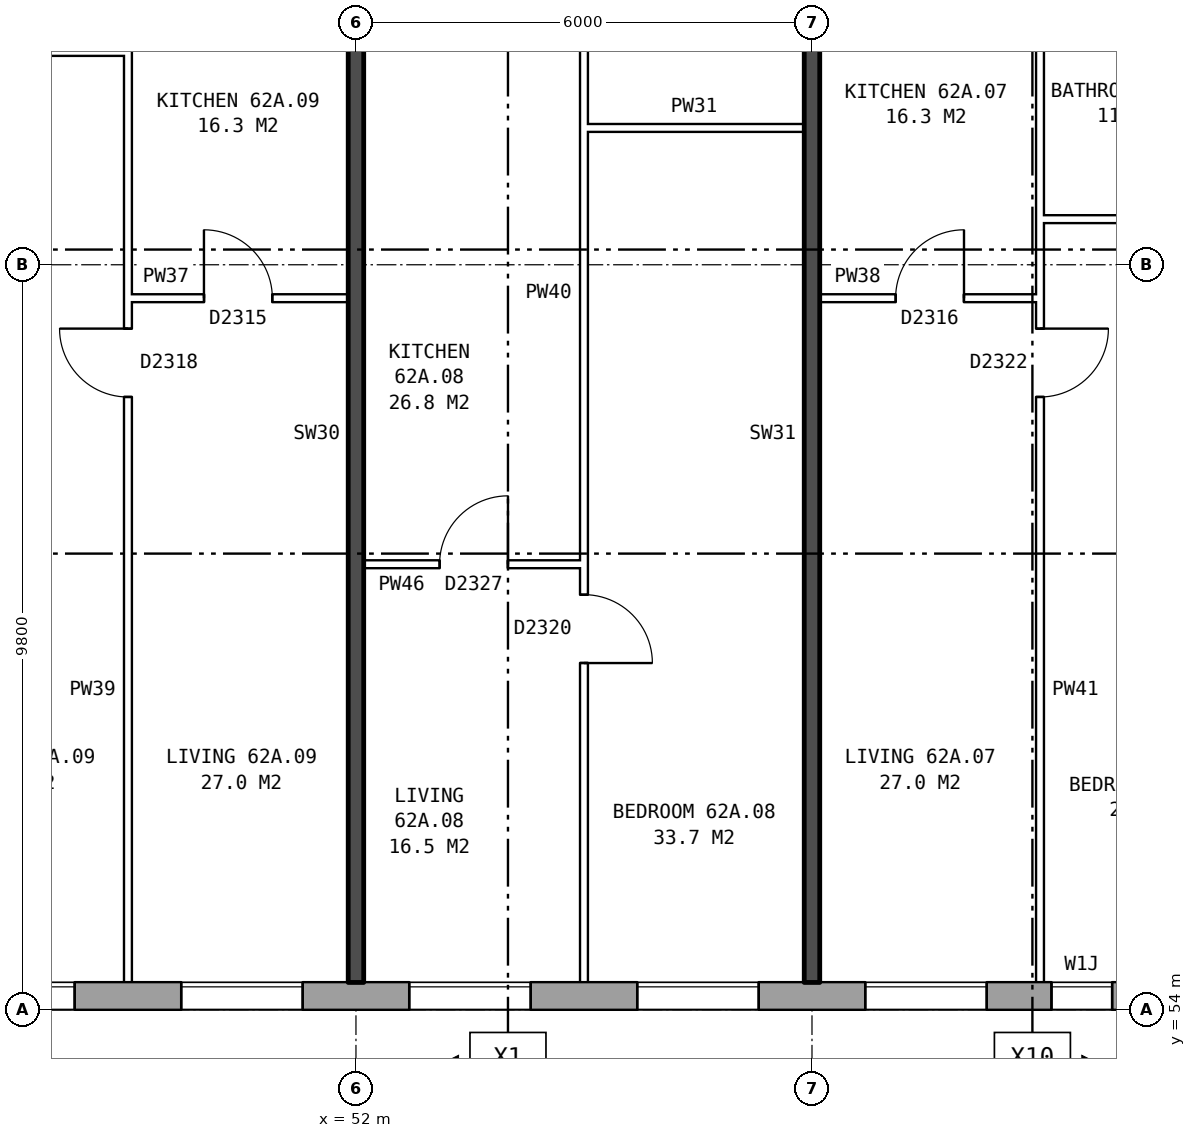
"""IFC4 building model, lengths in metres.
Left out: names, types, materials, properties, quantities, classifications, styles, units other than length and angle.
Written with IfcOpenShell. Run it as: python <this file> out.ifc"""

import sys

from ifc_helpers import new_model, si_unit, direction, frame, frame_2d, origin, place, context, subcontext, project, spatial, rectangle, extrude, element, fill, save


model = new_model("IFC4")
c1 = context("Model", 3, precision=1e-05, world=origin(), true_north=direction((0.0, 1.0)))
c2 = subcontext(c1, "Body", "Model", "MODEL_VIEW")
j1 = project(units=[si_unit("LENGTHUNIT", "METRE"), si_unit("PLANEANGLEUNIT", "RADIAN")], contexts=[c1])
p1 = place(None, origin())
s1 = spatial("IfcSite", under=j1, at=p1, CompositionType="ELEMENT")
p2 = place(p1, origin())
s2 = spatial("IfcBuilding", under=s1, at=p2, CompositionType="ELEMENT")
p3 = place(p2, frame((0.0, 0.0, 221.4)))
s3 = spatial("IfcBuildingStorey", under=s2, at=p3, CompositionType="ELEMENT", Elevation=221.4)
p4 = place(p3, frame((35.075, 54.18, 0.0), z_axis=(0.0, 0.0, 1.0), x_axis=(1.0, 0.0, 0.0)))
e1 = element("IfcWall", 1, at=p4, inside=s3, PredefinedType="STANDARD", context=c2, shape_type="SweptSolid", body=[
    extrude(rectangle(XDim=39.875, YDim=0.36, at=frame_2d((19.938, 0.0))), origin(), (0.0, 0.0, 1.0), 2.85),
])
p5 = place(p4, frame((2.625, 0.0, 0.8)))
e2 = element("IfcOpeningElement", 2, at=p5, cuts=e1, PredefinedType="OPENING", context=c2, shape_type="SweptSolid", body=[
    extrude(rectangle(XDim=1.6, YDim=1.8, at=frame_2d((0.8, 0.9))), frame((0.0, 0.19, 0.0), z_axis=(0.0, -1.0, 0.0), x_axis=(1.0, 0.0, 0.0)), (0.0, 0.0, 1.0), 0.38),
])
p6 = place(p4, frame((5.625, 0.0, 0.8)))
e3 = element("IfcOpeningElement", 3, at=p6, cuts=e1, PredefinedType="OPENING", context=c2, shape_type="SweptSolid", body=[
    extrude(rectangle(XDim=1.6, YDim=1.8, at=frame_2d((0.8, 0.9))), frame((0.0, 0.19, 0.0), z_axis=(0.0, -1.0, 0.0), x_axis=(1.0, 0.0, 0.0)), (0.0, 0.0, 1.0), 0.38),
])
p7 = place(p4, frame((7.525, 0.0, 0.8)))
e4 = element("IfcOpeningElement", 4, at=p7, cuts=e1, PredefinedType="OPENING", context=c2, shape_type="SweptSolid", body=[
    extrude(rectangle(XDim=1.4, YDim=1.8, at=frame_2d((0.7, 0.9))), frame((0.0, 0.19, 0.0), z_axis=(0.0, -1.0, 0.0), x_axis=(1.0, 0.0, 0.0)), (0.0, 0.0, 1.0), 0.38),
])
p8 = place(p4, frame((11.625, 0.0, 0.8)))
e5 = element("IfcOpeningElement", 5, at=p8, cuts=e1, PredefinedType="OPENING", context=c2, shape_type="SweptSolid", body=[
    extrude(rectangle(XDim=1.6, YDim=1.8, at=frame_2d((0.8, 0.9))), frame((0.0, 0.19, 0.0), z_axis=(0.0, -1.0, 0.0), x_axis=(1.0, 0.0, 0.0)), (0.0, 0.0, 1.0), 0.38),
])
p9 = place(p4, frame((14.625, 0.0, 0.8)))
e6 = element("IfcOpeningElement", 6, at=p9, cuts=e1, PredefinedType="OPENING", context=c2, shape_type="SweptSolid", body=[
    extrude(rectangle(XDim=1.6, YDim=1.8, at=frame_2d((0.8, 0.9))), frame((0.0, 0.19, 0.0), z_axis=(0.0, -1.0, 0.0), x_axis=(1.0, 0.0, 0.0)), (0.0, 0.0, 1.0), 0.38),
])
p10 = place(p4, frame((17.625, 0.0, 0.8)))
e7 = element("IfcOpeningElement", 7, at=p10, cuts=e1, PredefinedType="OPENING", context=c2, shape_type="SweptSolid", body=[
    extrude(rectangle(XDim=1.6, YDim=1.8, at=frame_2d((0.8, 0.9))), frame((0.0, 0.19, 0.0), z_axis=(0.0, -1.0, 0.0), x_axis=(1.0, 0.0, 0.0)), (0.0, 0.0, 1.0), 0.38),
])
p11 = place(p4, frame((20.625, 0.0, 0.8)))
e8 = element("IfcOpeningElement", 8, at=p11, cuts=e1, PredefinedType="OPENING", context=c2, shape_type="SweptSolid", body=[
    extrude(rectangle(XDim=1.6, YDim=1.8, at=frame_2d((0.8, 0.9))), frame((0.0, 0.19, 0.0), z_axis=(0.0, -1.0, 0.0), x_axis=(1.0, 0.0, 0.0)), (0.0, 0.0, 1.0), 0.38),
])
p12 = place(p4, frame((23.625, 0.0, 0.8)))
e9 = element("IfcOpeningElement", 9, at=p12, cuts=e1, PredefinedType="OPENING", context=c2, shape_type="SweptSolid", body=[
    extrude(rectangle(XDim=1.6, YDim=1.8, at=frame_2d((0.8, 0.9))), frame((0.0, 0.19, 0.0), z_axis=(0.0, -1.0, 0.0), x_axis=(1.0, 0.0, 0.0)), (0.0, 0.0, 1.0), 0.38),
])
p13 = place(p4, frame((26.075, 0.0, 0.15)))
e10 = element("IfcOpeningElement", 10, at=p13, cuts=e1, PredefinedType="OPENING", context=c2, shape_type="SweptSolid", body=[
    extrude(rectangle(XDim=0.8, YDim=1.5, at=frame_2d((0.4, 0.75))), frame((0.0, 0.19, 0.0), z_axis=(0.0, -1.0, 0.0), x_axis=(1.0, 0.0, 0.0)), (0.0, 0.0, 1.0), 0.38),
])
p14 = place(p4, frame((29.625, 0.0, 0.8)))
e11 = element("IfcOpeningElement", 11, at=p14, cuts=e1, PredefinedType="OPENING", context=c2, shape_type="SweptSolid", body=[
    extrude(rectangle(XDim=1.6, YDim=1.8, at=frame_2d((0.8, 0.9))), frame((0.0, 0.19, 0.0), z_axis=(0.0, -1.0, 0.0), x_axis=(1.0, 0.0, 0.0)), (0.0, 0.0, 1.0), 0.38),
])
p15 = place(p4, frame((32.625, 0.0, 0.8)))
e12 = element("IfcOpeningElement", 12, at=p15, cuts=e1, PredefinedType="OPENING", context=c2, shape_type="SweptSolid", body=[
    extrude(rectangle(XDim=1.6, YDim=1.8, at=frame_2d((0.8, 0.9))), frame((0.0, 0.19, 0.0), z_axis=(0.0, -1.0, 0.0), x_axis=(1.0, 0.0, 0.0)), (0.0, 0.0, 1.0), 0.38),
])
p16 = place(p4, frame((35.625, 0.0, 0.8)))
e13 = element("IfcOpeningElement", 13, at=p16, cuts=e1, PredefinedType="OPENING", context=c2, shape_type="SweptSolid", body=[
    extrude(rectangle(XDim=1.6, YDim=1.8, at=frame_2d((0.8, 0.9))), frame((0.0, 0.19, 0.0), z_axis=(0.0, -1.0, 0.0), x_axis=(1.0, 0.0, 0.0)), (0.0, 0.0, 1.0), 0.38),
])
p17 = place(p4, frame((9.225, 0.0, 1.7)))
e14 = element("IfcOpeningElement", 14, at=p17, cuts=e1, PredefinedType="OPENING", context=c2, shape_type="SweptSolid", body=[
    extrude(rectangle(XDim=0.6, YDim=0.9, at=frame_2d((0.3, 0.45))), frame((0.0, 0.19, 0.0), z_axis=(0.0, -1.0, 0.0), x_axis=(1.0, 0.0, 0.0)), (0.0, 0.0, 1.0), 0.38),
])
p18 = place(p4, frame((28.075, 0.0, 1.65)))
e15 = element("IfcOpeningElement", 15, at=p18, cuts=e1, PredefinedType="OPENING", context=c2, shape_type="SweptSolid", body=[
    extrude(rectangle(XDim=0.6, YDim=0.9, at=frame_2d((0.3, 0.45))), frame((0.0, 0.19, 0.0), z_axis=(0.0, -1.0, 0.0), x_axis=(1.0, 0.0, 0.0)), (0.0, 0.0, 1.0), 0.38),
])
p19 = place(p3, frame((52.1, 59.86, 0.0), z_axis=(0.0, 0.0, 1.0), x_axis=(1.0, 0.0, 0.0)))
e16 = element("IfcWall", 16, at=p19, inside=s3, PredefinedType="PARTITIONING", context=c2, shape_type="SweptSolid", body=[
    extrude(rectangle(XDim=2.9, YDim=0.1, at=frame_2d((1.45, 0.0))), origin(), (0.0, 0.0, 1.0), 2.85),
])
p20 = place(p19, frame((1.0, 0.0, 0.0)))
e17 = element("IfcOpeningElement", 17, at=p20, cuts=e16, PredefinedType="OPENING", context=c2, shape_type="SweptSolid", body=[
    extrude(rectangle(XDim=0.9, YDim=2.1, at=frame_2d((0.45, 1.05))), frame((0.0, 0.06, 0.0), z_axis=(0.0, -1.0, 0.0), x_axis=(1.0, 0.0, 0.0)), (0.0, 0.0, 1.0), 0.12),
])
p21 = place(p3, frame((49.0, 63.36, 0.0), z_axis=(0.0, 0.0, 1.0), x_axis=(1.0, 0.0, 0.0)))
e18 = element("IfcWall", 18, at=p21, inside=s3, PredefinedType="PARTITIONING", context=c2, shape_type="SweptSolid", body=[
    extrude(rectangle(XDim=2.9, YDim=0.1, at=frame_2d((1.45, 0.0))), origin(), (0.0, 0.0, 1.0), 2.85),
])
p22 = place(p21, frame((1.0, 0.0, 0.0)))
e19 = element("IfcOpeningElement", 19, at=p22, cuts=e18, PredefinedType="OPENING", context=c2, shape_type="SweptSolid", body=[
    extrude(rectangle(XDim=0.9, YDim=2.1, at=frame_2d((0.45, 1.05))), frame((0.0, 0.06, 0.0), z_axis=(0.0, -1.0, 0.0), x_axis=(1.0, 0.0, 0.0)), (0.0, 0.0, 1.0), 0.12),
])
p23 = place(p3, frame((58.1, 63.36, 0.0), z_axis=(0.0, 0.0, 1.0), x_axis=(1.0, 0.0, 0.0)))
e20 = element("IfcWall", 20, at=p23, inside=s3, PredefinedType="PARTITIONING", context=c2, shape_type="SweptSolid", body=[
    extrude(rectangle(XDim=2.9, YDim=0.1, at=frame_2d((1.45, 0.0))), origin(), (0.0, 0.0, 1.0), 2.85),
])
p24 = place(p23, frame((1.0, 0.0, 0.0)))
e21 = element("IfcOpeningElement", 21, at=p24, cuts=e20, PredefinedType="OPENING", context=c2, shape_type="SweptSolid", body=[
    extrude(rectangle(XDim=0.9, YDim=2.1, at=frame_2d((0.45, 1.05))), frame((0.0, 0.06, 0.0), z_axis=(0.0, -1.0, 0.0), x_axis=(1.0, 0.0, 0.0)), (0.0, 0.0, 1.0), 0.12),
])
p25 = place(p3, frame((61.0, 64.4, 0.0), z_axis=(0.0, 0.0, 1.0), x_axis=(1.0, 0.0, 0.0)))
e22 = element("IfcWall", 22, at=p25, inside=s3, PredefinedType="PARTITIONING", context=c2, shape_type="SweptSolid", body=[
    extrude(rectangle(XDim=2.64, YDim=0.1, at=frame_2d((1.32, 0.0))), origin(), (0.0, 0.0, 1.0), 2.85),
])
for number, where, z_axis, x_axis in (
    (23, (55.0, 65.6, 0.0), (0.0, 0.0, 1.0), (1.0, 0.0, 0.0)),
    (24, (46.1, 66.6, 0.0), (0.0, 0.0, 1.0), (1.0, 0.0, 0.0)),
):
    element("IfcWall", number, at=place(p3, frame(where, z_axis=z_axis, x_axis=x_axis)), inside=s3, PredefinedType="PARTITIONING", context=c2, shape_type="SweptSolid", body=[
        extrude(rectangle(XDim=2.9, YDim=0.1, at=frame_2d((1.45, 0.0))), origin(), (0.0, 0.0, 1.0), 2.85),
    ])
p26 = place(p3, frame((49.0, 54.36, 0.0), z_axis=(0.0, 0.0, 1.0), x_axis=(0.0, 1.0, 0.0)))
e25 = element("IfcWall", 25, at=p26, inside=s3, PredefinedType="PARTITIONING", context=c2, shape_type="SweptSolid", body=[
    extrude(rectangle(XDim=14.34, YDim=0.1, at=frame_2d((7.17, 0.0))), origin(), (0.0, 0.0, 1.0), 2.85),
])
p27 = place(p26, frame((7.7, 0.0, 0.0)))
e26 = element("IfcOpeningElement", 26, at=p27, cuts=e25, PredefinedType="OPENING", context=c2, shape_type="SweptSolid", body=[
    extrude(rectangle(XDim=0.9, YDim=2.1, at=frame_2d((0.45, 1.05))), frame((0.0, 0.06, 0.0), z_axis=(0.0, -1.0, 0.0), x_axis=(1.0, 0.0, 0.0)), (0.0, 0.0, 1.0), 0.12),
])
p28 = place(p26, frame((13.04, 0.0, 0.0)))
e27 = element("IfcOpeningElement", 27, at=p28, cuts=e25, PredefinedType="OPENING", context=c2, shape_type="SweptSolid", body=[
    extrude(rectangle(XDim=0.9, YDim=2.1, at=frame_2d((0.45, 1.05))), frame((0.0, 0.06, 0.0), z_axis=(0.0, -1.0, 0.0), x_axis=(1.0, 0.0, 0.0)), (0.0, 0.0, 1.0), 0.12),
])
p29 = place(p3, frame((52.0, 54.36, 0.0), z_axis=(0.0, 0.0, 1.0), x_axis=(0.0, 1.0, 0.0)))
e28 = element("IfcWall", 28, at=p29, inside=s3, PredefinedType="SOLIDWALL", context=c2, shape_type="SweptSolid", body=[
    extrude(rectangle(XDim=14.44, YDim=0.2, at=frame_2d((7.22, 0.0))), origin(), (0.0, 0.0, 1.0), 2.85),
])
p30 = place(p3, frame((55.0, 54.36, 0.0), z_axis=(0.0, 0.0, 1.0), x_axis=(0.0, 1.0, 0.0)))
e29 = element("IfcWall", 29, at=p30, inside=s3, PredefinedType="PARTITIONING", context=c2, shape_type="SweptSolid", body=[
    extrude(rectangle(XDim=14.34, YDim=0.1, at=frame_2d((7.17, 0.0))), origin(), (0.0, 0.0, 1.0), 2.85),
])
p31 = place(p30, frame((4.2, 0.0, 0.0)))
e30 = element("IfcOpeningElement", 30, at=p31, cuts=e29, PredefinedType="OPENING", context=c2, shape_type="SweptSolid", body=[
    extrude(rectangle(XDim=0.9, YDim=2.1, at=frame_2d((0.45, 1.05))), frame((0.0, 0.06, 0.0), z_axis=(0.0, -1.0, 0.0), x_axis=(1.0, 0.0, 0.0)), (0.0, 0.0, 1.0), 0.12),
])
p32 = place(p30, frame((13.04, 0.0, 0.0)))
e31 = element("IfcOpeningElement", 31, at=p32, cuts=e29, PredefinedType="OPENING", context=c2, shape_type="SweptSolid", body=[
    extrude(rectangle(XDim=0.9, YDim=2.1, at=frame_2d((0.45, 1.05))), frame((0.0, 0.06, 0.0), z_axis=(0.0, -1.0, 0.0), x_axis=(1.0, 0.0, 0.0)), (0.0, 0.0, 1.0), 0.12),
])
p33 = place(p3, frame((58.0, 54.36, 0.0), z_axis=(0.0, 0.0, 1.0), x_axis=(0.0, 1.0, 0.0)))
e32 = element("IfcWall", 32, at=p33, inside=s3, PredefinedType="SOLIDWALL", context=c2, shape_type="SweptSolid", body=[
    extrude(rectangle(XDim=14.44, YDim=0.2, at=frame_2d((7.22, 0.0))), origin(), (0.0, 0.0, 1.0), 2.85),
])
p34 = place(p3, frame((61.0, 54.36, 0.0), z_axis=(0.0, 0.0, 1.0), x_axis=(0.0, 1.0, 0.0)))
e33 = element("IfcWall", 33, at=p34, inside=s3, PredefinedType="PARTITIONING", context=c2, shape_type="SweptSolid", body=[
    extrude(rectangle(XDim=14.34, YDim=0.1, at=frame_2d((7.17, 0.0))), origin(), (0.0, 0.0, 1.0), 2.85),
])
p35 = place(p34, frame((7.7, 0.0, 0.0)))
e34 = element("IfcOpeningElement", 34, at=p35, cuts=e33, PredefinedType="OPENING", context=c2, shape_type="SweptSolid", body=[
    extrude(rectangle(XDim=0.9, YDim=2.1, at=frame_2d((0.45, 1.05))), frame((0.0, 0.06, 0.0), z_axis=(0.0, -1.0, 0.0), x_axis=(1.0, 0.0, 0.0)), (0.0, 0.0, 1.0), 0.12),
])
p36 = place(p34, frame((13.04, 0.0, 0.0)))
e35 = element("IfcOpeningElement", 35, at=p36, cuts=e33, PredefinedType="OPENING", context=c2, shape_type="SweptSolid", body=[
    extrude(rectangle(XDim=0.9, YDim=2.1, at=frame_2d((0.45, 1.05))), frame((0.0, 0.06, 0.0), z_axis=(0.0, -1.0, 0.0), x_axis=(1.0, 0.0, 0.0)), (0.0, 0.0, 1.0), 0.12),
])
p37 = place(p8, origin())
e36 = element("IfcWindow", 36, at=p37, inside=s3, PartitioningType="SINGLE_PANEL", PredefinedType="WINDOW", context=c2, shape_type="SweptSolid", body=[
    extrude(rectangle(XDim=1.6, YDim=1.8, at=frame_2d((0.8, 0.9))), frame((0.0, 0.15, 0.0), z_axis=(0.0, -1.0, 0.0), x_axis=(1.0, 0.0, 0.0)), (0.0, 0.0, 1.0), 0.06),
])
fill(e5, e36)
p38 = place(p9, origin())
e37 = element("IfcWindow", 37, at=p38, inside=s3, PartitioningType="SINGLE_PANEL", PredefinedType="WINDOW", context=c2, shape_type="SweptSolid", body=[
    extrude(rectangle(XDim=1.6, YDim=1.8, at=frame_2d((0.8, 0.9))), frame((0.0, 0.15, 0.0), z_axis=(0.0, -1.0, 0.0), x_axis=(1.0, 0.0, 0.0)), (0.0, 0.0, 1.0), 0.06),
])
fill(e6, e37)
p39 = place(p10, origin())
e38 = element("IfcWindow", 38, at=p39, inside=s3, PartitioningType="SINGLE_PANEL", PredefinedType="WINDOW", context=c2, shape_type="SweptSolid", body=[
    extrude(rectangle(XDim=1.6, YDim=1.8, at=frame_2d((0.8, 0.9))), frame((0.0, 0.15, 0.0), z_axis=(0.0, -1.0, 0.0), x_axis=(1.0, 0.0, 0.0)), (0.0, 0.0, 1.0), 0.06),
])
fill(e7, e38)
p40 = place(p11, origin())
e39 = element("IfcWindow", 39, at=p40, inside=s3, PartitioningType="SINGLE_PANEL", PredefinedType="WINDOW", context=c2, shape_type="SweptSolid", body=[
    extrude(rectangle(XDim=1.6, YDim=1.8, at=frame_2d((0.8, 0.9))), frame((0.0, 0.15, 0.0), z_axis=(0.0, -1.0, 0.0), x_axis=(1.0, 0.0, 0.0)), (0.0, 0.0, 1.0), 0.06),
])
fill(e8, e39)
p41 = place(p12, origin())
e40 = element("IfcWindow", 40, at=p41, inside=s3, PartitioningType="SINGLE_PANEL", PredefinedType="WINDOW", context=c2, shape_type="SweptSolid", body=[
    extrude(rectangle(XDim=1.6, YDim=1.8, at=frame_2d((0.8, 0.9))), frame((0.0, 0.15, 0.0), z_axis=(0.0, -1.0, 0.0), x_axis=(1.0, 0.0, 0.0)), (0.0, 0.0, 1.0), 0.06),
])
fill(e9, e40)
p42 = place(p13, origin())
e41 = element("IfcWindow", 41, at=p42, inside=s3, PartitioningType="SINGLE_PANEL", PredefinedType="WINDOW", context=c2, shape_type="SweptSolid", body=[
    extrude(rectangle(XDim=0.8, YDim=1.5, at=frame_2d((0.4, 0.75))), frame((0.0, 0.15, 0.0), z_axis=(0.0, -1.0, 0.0), x_axis=(1.0, 0.0, 0.0)), (0.0, 0.0, 1.0), 0.06),
])
fill(e10, e41)
p43 = place(p35, frame((0.9, 0.0, 0.0), z_axis=(0.0, 0.0, 1.0), x_axis=(-1.0, 0.0, 0.0)))
e42 = element("IfcDoor", 42, at=p43, inside=s3, OperationType="SINGLE_SWING_LEFT", PredefinedType="DOOR", context=c2, shape_type="SweptSolid", body=[
    extrude(rectangle(XDim=0.9, YDim=2.1, at=frame_2d((0.45, 1.05))), frame((0.0, 0.025, 0.0), z_axis=(0.0, -1.0, 0.0), x_axis=(1.0, 0.0, 0.0)), (0.0, 0.0, 1.0), 0.05),
])
fill(e34, e42)
p44 = place(p24, origin())
e43 = element("IfcDoor", 43, at=p44, inside=s3, OperationType="SINGLE_SWING_RIGHT", PredefinedType="DOOR", context=c2, shape_type="SweptSolid", body=[
    extrude(rectangle(XDim=0.9, YDim=2.1, at=frame_2d((0.45, 1.05))), frame((0.0, 0.025, 0.0), z_axis=(0.0, -1.0, 0.0), x_axis=(1.0, 0.0, 0.0)), (0.0, 0.0, 1.0), 0.05),
])
fill(e21, e43)
p45 = place(p31, frame((0.9, 0.0, 0.0), z_axis=(0.0, 0.0, 1.0), x_axis=(-1.0, 0.0, 0.0)))
e44 = element("IfcDoor", 44, at=p45, inside=s3, OperationType="SINGLE_SWING_RIGHT", PredefinedType="DOOR", context=c2, shape_type="SweptSolid", body=[
    extrude(rectangle(XDim=0.9, YDim=2.1, at=frame_2d((0.45, 1.05))), frame((0.0, 0.025, 0.0), z_axis=(0.0, -1.0, 0.0), x_axis=(1.0, 0.0, 0.0)), (0.0, 0.0, 1.0), 0.05),
])
fill(e30, e44)
p46 = place(p20, origin())
e45 = element("IfcDoor", 45, at=p46, inside=s3, OperationType="SINGLE_SWING_RIGHT", PredefinedType="DOOR", context=c2, shape_type="SweptSolid", body=[
    extrude(rectangle(XDim=0.9, YDim=2.1, at=frame_2d((0.45, 1.05))), frame((0.0, 0.025, 0.0), z_axis=(0.0, -1.0, 0.0), x_axis=(1.0, 0.0, 0.0)), (0.0, 0.0, 1.0), 0.05),
])
fill(e17, e45)
p47 = place(p27, origin())
e46 = element("IfcDoor", 46, at=p47, inside=s3, OperationType="SINGLE_SWING_RIGHT", PredefinedType="DOOR", context=c2, shape_type="SweptSolid", body=[
    extrude(rectangle(XDim=0.9, YDim=2.1, at=frame_2d((0.45, 1.05))), frame((0.0, 0.025, 0.0), z_axis=(0.0, -1.0, 0.0), x_axis=(1.0, 0.0, 0.0)), (0.0, 0.0, 1.0), 0.05),
])
fill(e26, e46)
p48 = place(p22, origin())
e47 = element("IfcDoor", 47, at=p48, inside=s3, OperationType="SINGLE_SWING_LEFT", PredefinedType="DOOR", context=c2, shape_type="SweptSolid", body=[
    extrude(rectangle(XDim=0.9, YDim=2.1, at=frame_2d((0.45, 1.05))), frame((0.0, 0.025, 0.0), z_axis=(0.0, -1.0, 0.0), x_axis=(1.0, 0.0, 0.0)), (0.0, 0.0, 1.0), 0.05),
])
fill(e19, e47)
save(model, sys.argv[1])
